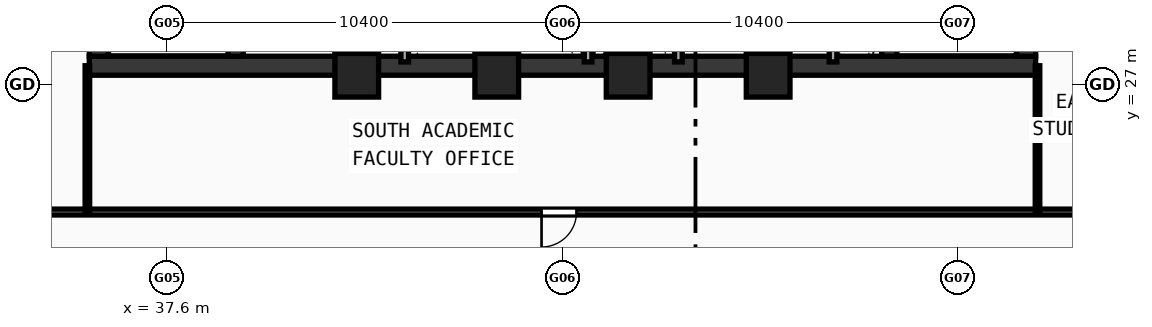
"""IFC4 building model, lengths in metres.
Left out: names, types, materials, properties, quantities, classifications, styles, units other than length and angle.
Written with IfcOpenShell. Run it as: python <this file> out.ifc"""

import sys

from ifc_helpers import new_model, si_unit, direction, frame, frame_2d, origin, origin_2d, place, context, subcontext, project, spatial, rectangle, hollow_rectangle, extrude, source, transform, mapped, element, fill, save


model = new_model("IFC4")
c1 = context("Model", 3, precision=1e-05, world=origin(), true_north=direction((0.0, 1.0)))
c2 = subcontext(c1, "Body", "Model", "MODEL_VIEW")
j1 = project(units=[si_unit("LENGTHUNIT", "METRE"), si_unit("PLANEANGLEUNIT", "RADIAN")], contexts=[c1])
p1 = place(None, origin())
s1 = spatial("IfcSite", under=j1, at=p1, CompositionType="ELEMENT")
p2 = place(p1, origin())
s2 = spatial("IfcBuilding", under=s1, at=p2, CompositionType="ELEMENT")
p3 = place(p2, frame((0.0, 0.0, 184.76)))
s3 = spatial("IfcBuildingStorey", under=s2, at=p3, CompositionType="ELEMENT", Elevation=184.76)
p4 = place(p3, frame((35.55, 27.5, 0.0), z_axis=(0.0, 0.0, 1.0), x_axis=(1.0, 0.0, 0.0)))
e1 = element("IfcWall", 1, at=p4, inside=s3, PredefinedType="SHEAR", context=c2, shape_type="SweptSolid", body=[
    extrude(rectangle(XDim=24.9, YDim=0.5, at=frame_2d((12.45, 0.0))), origin(), (0.0, 0.0, 1.0), 3.54),
])
for number, where, z_axis, x_axis in (
    (2, (35.8, 27.75, 0.0), (0.0, 0.0, 1.0), (0.0, 1.0, 0.0)),
    (3, (60.2, 27.75, 0.0), (0.0, 0.0, 1.0), (0.0, 1.0, 0.0)),
):
    element("IfcWall", number, at=place(p3, frame(where, z_axis=z_axis, x_axis=x_axis)), inside=s3, PredefinedType="SHEAR", context=c2, shape_type="SweptSolid", body=[
        extrude(rectangle(XDim=12.2, YDim=0.5, at=frame_2d((6.1, 0.0))), origin(), (0.0, 0.0, 1.0), 3.54),
    ])
p5 = place(p3, frame((39.4, 27.75, 0.0), z_axis=(0.0, 0.0, 1.0), x_axis=(0.0, 1.0, 0.0)))
e4 = element("IfcWall", 4, at=p5, inside=s3, PredefinedType="SHEAR", context=c2, shape_type="SweptSolid", body=[
    extrude(rectangle(XDim=12.2, YDim=0.4, at=frame_2d((6.1, 0.0))), origin(), (0.0, 0.0, 1.0), 3.54),
])
p6 = place(p5, frame((10.0, 0.0, 0.0)))
e5 = element("IfcOpeningElement", 5, at=p6, cuts=e4, PredefinedType="OPENING", context=c2, shape_type="SweptSolid", body=[
    extrude(rectangle(XDim=1.1, YDim=2.1, at=frame_2d((0.55, 1.05))), frame((0.0, 0.21, 0.0), z_axis=(0.0, -1.0, 0.0), x_axis=(1.0, 0.0, 0.0)), (0.0, 0.0, 1.0), 0.42),
])
p7 = place(p3, frame((56.6, 27.75, 0.0), z_axis=(0.0, 0.0, 1.0), x_axis=(0.0, 1.0, 0.0)))
e6 = element("IfcWall", 6, at=p7, inside=s3, PredefinedType="SHEAR", context=c2, shape_type="SweptSolid", body=[
    extrude(rectangle(XDim=12.2, YDim=0.4, at=frame_2d((6.1, 0.0))), origin(), (0.0, 0.0, 1.0), 3.54),
])
p8 = place(p7, frame((10.0, 0.0, 0.0)))
e7 = element("IfcOpeningElement", 7, at=p8, cuts=e6, PredefinedType="OPENING", context=c2, shape_type="SweptSolid", body=[
    extrude(rectangle(XDim=1.1, YDim=2.1, at=frame_2d((0.55, 1.05))), frame((0.0, 0.21, 0.0), z_axis=(0.0, -1.0, 0.0), x_axis=(1.0, 0.0, 0.0)), (0.0, 0.0, 1.0), 0.42),
])
m1 = source(origin(), c2, "Body", "SweptSolid", [
    extrude(hollow_rectangle(XDim=1.15, YDim=1.15, WallThickness=0.048, at=origin_2d()), origin(), (0.0, 0.0, 1.0), 3.8),
])
for number, where, z_axis, x_axis in (
    (8, (42.588, 27.25, -0.26), (0.0, 0.0, 1.0), (1.0, 0.0, 0.0)),
    (9, (46.272, 27.25, -0.26), (0.0, 0.0, 1.0), (1.0, 0.0, 0.0)),
    (10, (49.729, 27.25, -0.26), (0.0, 0.0, 1.0), (1.0, 0.0, 0.0)),
    (11, (53.412, 27.25, -0.26), (0.0, 0.0, 1.0), (1.0, 0.0, 0.0)),
):
    element("IfcColumn", number, at=place(p3, frame(where, z_axis=z_axis, x_axis=x_axis)), inside=s3, PredefinedType="COLUMN", context=c2, shape_type="MappedRepresentation", body=[
        mapped(m1, transform((0.0, 0.0, 0.0), scale=1.0)),
    ])
p9 = place(p3, frame((43.85, 27.6, 0.0), z_axis=(0.0, 0.0, 1.0), x_axis=(0.0, 1.0, 0.0)))
e12 = element("IfcWall", 12, at=p9, inside=s3, PredefinedType="SOLIDWALL", context=c2, shape_type="SweptSolid", body=[
    extrude(rectangle(XDim=6.22, YDim=0.2, at=frame_2d((3.11, 0.0))), origin(), (0.0, 0.0, 1.0), 3.54),
])
p10 = place(p9, frame((2.25, 0.0, 0.0)))
e13 = element("IfcOpeningElement", 13, at=p10, cuts=e12, PredefinedType="OPENING", context=c2, shape_type="SweptSolid", body=[
    extrude(rectangle(XDim=1.05, YDim=2.1, at=frame_2d((0.525, 1.05))), frame((0.0, 0.11, 0.0), z_axis=(0.0, -1.0, 0.0), x_axis=(1.0, 0.0, 0.0)), (0.0, 0.0, 1.0), 0.22),
])
p11 = place(p3, frame((53.68, 27.6, 0.0), z_axis=(0.0, 0.0, 1.0), x_axis=(0.0, 1.0, 0.0)))
e14 = element("IfcWall", 14, at=p11, inside=s3, PredefinedType="SOLIDWALL", context=c2, shape_type="SweptSolid", body=[
    extrude(rectangle(XDim=9.05, YDim=0.2, at=frame_2d((4.525, 0.0))), origin(), (0.0, 0.0, 1.0), 3.54),
])
p12 = place(p11, frame((6.9, 0.0, 0.0)))
e15 = element("IfcOpeningElement", 15, at=p12, cuts=e14, PredefinedType="OPENING", context=c2, shape_type="SweptSolid", body=[
    extrude(rectangle(XDim=1.05, YDim=2.1, at=frame_2d((0.525, 1.05))), frame((0.0, 0.11, 0.0), z_axis=(0.0, -1.0, 0.0), x_axis=(1.0, 0.0, 0.0)), (0.0, 0.0, 1.0), 0.22),
])
for number, where, z_axis, x_axis in (
    (16, (51.05, 27.6, 0.0), (0.0, 0.0, 1.0), (0.0, 1.0, 0.0)),
    (17, (46.225, 27.6, 0.0), (0.0, 0.0, 1.0), (0.0, 1.0, 0.0)),
    (18, (48.675, 27.6, 0.0), (0.0, 0.0, 1.0), (0.0, 1.0, 0.0)),
    (19, (55.12, 27.6, 0.0), (0.0, 0.0, 1.0), (0.0, 1.0, 0.0)),
):
    element("IfcWall", number, at=place(p3, frame(where, z_axis=z_axis, x_axis=x_axis)), inside=s3, PredefinedType="SOLIDWALL", context=c2, shape_type="SweptSolid", body=[
        extrude(rectangle(XDim=2.12, YDim=0.2, at=frame_2d((1.06, 0.0))), origin(), (0.0, 0.0, 1.0), 3.54),
    ])
p13 = place(p3, frame((42.32, 27.6, 0.0), z_axis=(0.0, 0.0, 1.0), x_axis=(0.0, 1.0, 0.0)))
e20 = element("IfcWall", 20, at=p13, inside=s3, PredefinedType="PARTITIONING", context=c2, shape_type="SweptSolid", body=[
    extrude(rectangle(XDim=5.9, YDim=0.155, at=frame_2d((2.95, 0.0))), origin(), (0.0, 0.0, 1.0), 3.54),
])
p14 = place(p13, frame((1.1, 0.0, 0.0)))
e21 = element("IfcOpeningElement", 21, at=p14, cuts=e20, PredefinedType="OPENING", context=c2, shape_type="SweptSolid", body=[
    extrude(rectangle(XDim=0.9, YDim=2.1, at=frame_2d((0.45, 1.05))), frame((0.0, 0.087, 0.0), z_axis=(0.0, -1.0, 0.0), x_axis=(1.0, 0.0, 0.0)), (0.0, 0.0, 1.0), 0.175),
])
p15 = place(p13, frame((3.6, 0.0, 0.0)))
e22 = element("IfcOpeningElement", 22, at=p15, cuts=e20, PredefinedType="OPENING", context=c2, shape_type="SweptSolid", body=[
    extrude(rectangle(XDim=0.94, YDim=2.1, at=frame_2d((0.47, 1.05))), frame((0.0, 0.087, 0.0), z_axis=(0.0, -1.0, 0.0), x_axis=(1.0, 0.0, 0.0)), (0.0, 0.0, 1.0), 0.175),
])
p16 = place(p3, frame((31.45, 23.65, 0.0), z_axis=(0.0, 0.0, 1.0), x_axis=(1.0, 0.0, 0.0)))
e23 = element("IfcWall", 23, at=p16, inside=s3, PredefinedType="PARTITIONING", context=c2, shape_type="SweptSolid", body=[
    extrude(rectangle(XDim=33.1, YDim=0.155, at=frame_2d((16.55, 0.0))), origin(), (0.0, 0.0, 1.0), 2.89),
])
p17 = place(p16, frame((16.0, 0.0, 0.0)))
e24 = element("IfcOpeningElement", 24, at=p17, cuts=e23, PredefinedType="OPENING", context=c2, shape_type="SweptSolid", body=[
    extrude(rectangle(XDim=0.92, YDim=2.1, at=frame_2d((0.46, 1.05))), frame((0.0, 0.087, 0.0), z_axis=(0.0, -1.0, 0.0), x_axis=(1.0, 0.0, 0.0)), (0.0, 0.0, 1.0), 0.175),
])
for number, where, z_axis, x_axis in (
    (25, (35.5, 23.65, 0.0), (0.0, 0.0, 1.0), (0.0, 1.0, 0.0)),
    (26, (60.5, 23.65, 0.0), (0.0, 0.0, 1.0), (0.0, 1.0, 0.0)),
):
    element("IfcWall", number, at=place(p3, frame(where, z_axis=z_axis, x_axis=x_axis)), inside=s3, PredefinedType="PARTITIONING", context=c2, shape_type="SweptSolid", body=[
        extrude(rectangle(XDim=3.85, YDim=0.12, at=frame_2d((1.925, 0.0))), origin(), (0.0, 0.0, 1.0), 3.14),
    ])
m2 = source(origin(), c2, "Body", "SweptSolid", [
    extrude(rectangle(XDim=0.92, YDim=2.1, at=frame_2d((0.46, 1.05))), frame((0.0, 0.025, 0.0), z_axis=(0.0, -1.0, 0.0), x_axis=(1.0, 0.0, 0.0)), (0.0, 0.0, 1.0), 0.05),
])
p18 = place(p17, frame((0.92, 0.0, 0.0), z_axis=(0.0, 0.0, 1.0), x_axis=(-1.0, 0.0, 0.0)))
e27 = element("IfcDoor", 27, at=p18, inside=s3, OperationType="SINGLE_SWING_RIGHT", PredefinedType="DOOR", context=c2, shape_type="MappedRepresentation", body=[
    mapped(m2, transform((0.0, 0.0, 0.0), scale=1.0)),
])
fill(e24, e27)
save(model, sys.argv[1])
